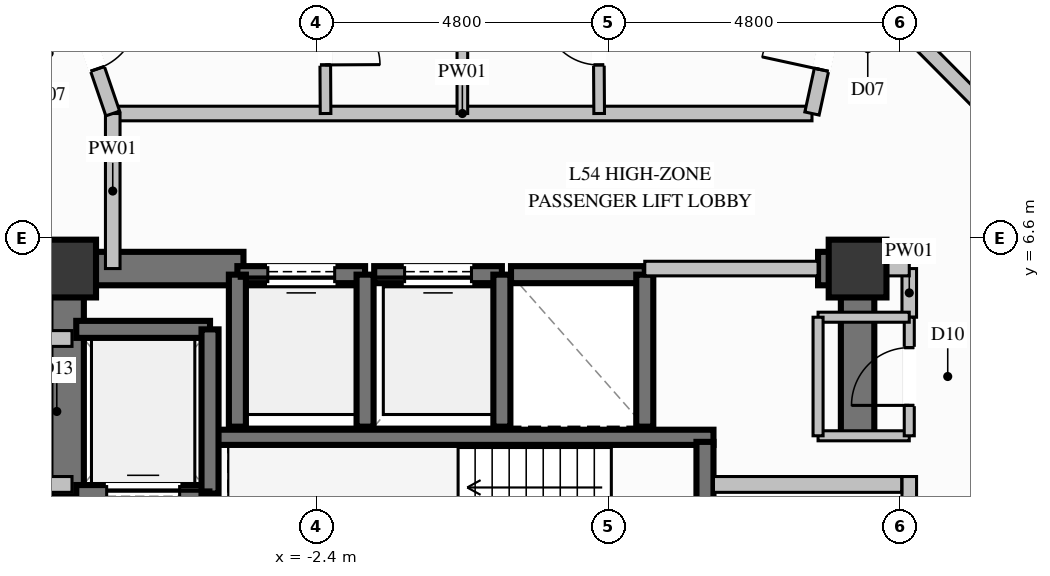
"""IFC4 building model, lengths in metres.
Left out: names, types, materials, properties, quantities, classifications, styles, units other than length and angle.
Written with IfcOpenShell. Run it as: python <this file> out.ifc"""

import sys

from ifc_helpers import new_model, si_unit, direction, frame, frame_2d, origin, origin_2d, place, context, subcontext, project, spatial, rectangle, extrude, element, fill, save


model = new_model("IFC4")
c1 = context("Model", 3, precision=1e-05, world=origin(), true_north=direction((0.0, 1.0)))
c2 = subcontext(c1, "Body", "Model", "MODEL_VIEW")
j1 = project(units=[si_unit("LENGTHUNIT", "METRE"), si_unit("PLANEANGLEUNIT", "RADIAN")], contexts=[c1])
p1 = place(None, origin())
s1 = spatial("IfcSite", under=j1, at=p1, CompositionType="ELEMENT")
p2 = place(p1, origin())
s2 = spatial("IfcBuilding", under=s1, at=p2, CompositionType="ELEMENT")
p3 = place(p2, frame((0.0, 0.0, 209.2)))
s3 = spatial("IfcBuildingStorey", under=s2, at=p3, CompositionType="ELEMENT", Elevation=209.2)
for number, where, z_axis, x_axis in (
    (1, (6.5, 6.1, 0.0), (0.0, 0.0, 1.0), (1.0, 0.0, 0.0)),
    (2, (-6.5, 6.1, 0.0), (0.0, 0.0, 1.0), (1.0, 0.0, 0.0)),
):
    element("IfcColumn", number, at=place(p3, frame(where, z_axis=z_axis, x_axis=x_axis)), inside=s3, PredefinedType="COLUMN", context=c2, shape_type="SweptSolid", body=[
        extrude(rectangle(XDim=0.95, YDim=0.95, at=origin_2d()), origin(), (0.0, 0.0, 1.0), 3.6),
    ])
p4 = place(p3, frame((-4.13, 3.325, 0.0), z_axis=(0.0, 0.0, 1.0), x_axis=(1.0, 0.0, 0.0)))
e3 = element("IfcWall", 3, at=p4, inside=s3, PredefinedType="SOLIDWALL", context=c2, shape_type="SweptSolid", body=[
    extrude(rectangle(XDim=8.26, YDim=0.25, at=frame_2d((4.13, 0.0))), origin(), (0.0, 0.0, 1.0), 3.6),
])
p5 = place(p3, frame((-6.225, 6.1, 0.0), z_axis=(0.0, 0.0, 1.0), x_axis=(1.0, 0.0, 0.0)))
e4 = element("IfcWall", 4, at=p5, inside=s3, PredefinedType="SHEAR", context=c2, shape_type="SweptSolid", body=[
    extrude(rectangle(XDim=2.625, YDim=0.55, at=frame_2d((1.312, 0.0))), origin(), (0.0, 0.0, 1.0), 3.6),
])
p6 = place(p3, frame((5.85, 6.1, 0.0), z_axis=(0.0, 0.0, 1.0), x_axis=(1.0, 0.0, 0.0)))
e5 = element("IfcWall", 5, at=p6, inside=s3, PredefinedType="SHEAR", context=c2, shape_type="SweptSolid", body=[
    extrude(rectangle(XDim=0.375, YDim=0.55, at=frame_2d((0.188, 0.0))), origin(), (0.0, 0.0, 1.0), 3.6),
])
p7 = place(p3, frame((-6.5, 2.35, 0.0), z_axis=(0.0, 0.0, 1.0), x_axis=(0.0, 1.0, 0.0)))
e6 = element("IfcWall", 6, at=p7, inside=s3, PredefinedType="SHEAR", context=c2, shape_type="SweptSolid", body=[
    extrude(rectangle(XDim=4.025, YDim=0.55, at=frame_2d((2.012, 0.0))), origin(), (0.0, 0.0, 1.0), 3.6),
])
p8 = place(p3, frame((6.5, 3.35, 0.0), z_axis=(0.0, 0.0, 1.0), x_axis=(0.0, 1.0, 0.0)))
e7 = element("IfcWall", 7, at=p8, inside=s3, PredefinedType="SHEAR", context=c2, shape_type="SweptSolid", body=[
    extrude(rectangle(XDim=3.025, YDim=0.55, at=frame_2d((1.512, 0.0))), origin(), (0.0, 0.0, 1.0), 3.6),
])
p9 = place(p3, frame((-1.6, 6.0, 0.0), z_axis=(0.0, 0.0, 1.0), x_axis=(-1.0, 0.0, 0.0)))
e8 = element("IfcWall", 8, at=p9, inside=s3, PredefinedType="SOLIDWALL", context=c2, shape_type="SweptSolid", body=[
    extrude(rectangle(XDim=2.1, YDim=0.28, at=frame_2d((1.05, 0.0))), origin(), (0.0, 0.0, 1.0), 3.36),
])
p10 = place(p9, frame((0.5, 0.0, 0.0)))
e9 = element("IfcOpeningElement", 9, at=p10, cuts=e8, PredefinedType="OPENING", context=c2, shape_type="SweptSolid", body=[
    extrude(rectangle(XDim=1.1, YDim=2.2, at=frame_2d((0.55, 1.1))), frame((0.0, 0.15, 0.0), z_axis=(0.0, -1.0, 0.0), x_axis=(1.0, 0.0, 0.0)), (0.0, 0.0, 1.0), 0.3),
])
for number, where, z_axis, x_axis in (
    (10, (-3.7, 6.0, 0.0), (0.0, 0.0, 1.0), (0.0, -1.0, 0.0)),
    (11, (-1.6, 3.5, 0.0), (0.0, 0.0, 1.0), (0.0, 1.0, 0.0)),
):
    element("IfcWall", number, at=place(p3, frame(where, z_axis=z_axis, x_axis=x_axis)), inside=s3, PredefinedType="SOLIDWALL", context=c2, shape_type="SweptSolid", body=[
        extrude(rectangle(XDim=2.5, YDim=0.28, at=frame_2d((1.25, 0.0))), origin(), (0.0, 0.0, 1.0), 3.36),
    ])
p11 = place(p3, frame((0.65, 6.0, 0.0), z_axis=(0.0, 0.0, 1.0), x_axis=(-1.0, 0.0, 0.0)))
e12 = element("IfcWall", 12, at=p11, inside=s3, PredefinedType="SOLIDWALL", context=c2, shape_type="SweptSolid", body=[
    extrude(rectangle(XDim=2.1, YDim=0.28, at=frame_2d((1.05, 0.0))), origin(), (0.0, 0.0, 1.0), 3.36),
])
p12 = place(p11, frame((0.5, 0.0, 0.0)))
e13 = element("IfcOpeningElement", 13, at=p12, cuts=e12, PredefinedType="OPENING", context=c2, shape_type="SweptSolid", body=[
    extrude(rectangle(XDim=1.1, YDim=2.2, at=frame_2d((0.55, 1.1))), frame((0.0, 0.15, 0.0), z_axis=(0.0, -1.0, 0.0), x_axis=(1.0, 0.0, 0.0)), (0.0, 0.0, 1.0), 0.3),
])
p13 = place(p3, frame((0.65, 3.5, 0.0), z_axis=(0.0, 0.0, 1.0), x_axis=(0.0, 1.0, 0.0)))
e14 = element("IfcWall", 14, at=p13, inside=s3, PredefinedType="SOLIDWALL", context=c2, shape_type="SweptSolid", body=[
    extrude(rectangle(XDim=2.5, YDim=0.28, at=frame_2d((1.25, 0.0))), origin(), (0.0, 0.0, 1.0), 3.36),
])
p14 = place(p3, frame((3.0, 6.0, 0.0), z_axis=(0.0, 0.0, 1.0), x_axis=(-1.0, 0.0, 0.0)))
e15 = element("IfcWall", 15, at=p14, inside=s3, PredefinedType="SOLIDWALL", context=c2, shape_type="SweptSolid", body=[
    extrude(rectangle(XDim=2.2, YDim=0.28, at=frame_2d((1.1, 0.0))), origin(), (0.0, 0.0, 1.0), 3.36),
])
p15 = place(p3, frame((3.0, 3.5, 0.0), z_axis=(0.0, 0.0, 1.0), x_axis=(0.0, 1.0, 0.0)))
e16 = element("IfcWall", 16, at=p15, inside=s3, PredefinedType="SOLIDWALL", context=c2, shape_type="SweptSolid", body=[
    extrude(rectangle(XDim=2.5, YDim=0.28, at=frame_2d((1.25, 0.0))), origin(), (0.0, 0.0, 1.0), 3.36),
])
p16 = place(p3, frame((-6.35, 2.4, 0.0), z_axis=(0.0, 0.0, 1.0), x_axis=(1.0, 0.0, 0.0)))
e17 = element("IfcWall", 17, at=p16, inside=s3, PredefinedType="SOLIDWALL", context=c2, shape_type="SweptSolid", body=[
    extrude(rectangle(XDim=2.2, YDim=0.28, at=frame_2d((1.1, 0.0))), origin(), (0.0, 0.0, 1.0), 3.36),
])
p17 = place(p16, frame((0.5, 0.0, 0.0)))
e18 = element("IfcOpeningElement", 18, at=p17, cuts=e17, PredefinedType="OPENING", context=c2, shape_type="SweptSolid", body=[
    extrude(rectangle(XDim=1.2, YDim=2.2, at=frame_2d((0.6, 1.1))), frame((0.0, 0.15, 0.0), z_axis=(0.0, -1.0, 0.0), x_axis=(1.0, 0.0, 0.0)), (0.0, 0.0, 1.0), 0.3),
])
p18 = place(p3, frame((-4.15, 5.1, 0.0), z_axis=(0.0, 0.0, 1.0), x_axis=(-1.0, 0.0, 0.0)))
e19 = element("IfcWall", 19, at=p18, inside=s3, PredefinedType="SOLIDWALL", context=c2, shape_type="SweptSolid", body=[
    extrude(rectangle(XDim=2.2, YDim=0.28, at=frame_2d((1.1, 0.0))), origin(), (0.0, 0.0, 1.0), 3.36),
])
p19 = place(p3, frame((-4.15, 2.4, 0.0), z_axis=(0.0, 0.0, 1.0), x_axis=(0.0, 1.0, 0.0)))
e20 = element("IfcWall", 20, at=p19, inside=s3, PredefinedType="SOLIDWALL", context=c2, shape_type="SweptSolid", body=[
    extrude(rectangle(XDim=2.7, YDim=0.28, at=frame_2d((1.35, 0.0))), origin(), (0.0, 0.0, 1.0), 3.36),
])
p20 = place(p3, frame((3.99, -2.21, 0.0), z_axis=(0.0, 0.0, 1.0), x_axis=(0.0, 1.0, 0.0)))
e21 = element("IfcWall", 21, at=p20, inside=s3, PredefinedType="SOLIDWALL", context=c2, shape_type="SweptSolid", body=[
    extrude(rectangle(XDim=5.46, YDim=0.28, at=frame_2d((2.73, 0.0))), origin(), (0.0, 0.0, 1.0), 3.36),
])
p21 = place(p20, frame((3.323, 0.0, 0.0)))
e22 = element("IfcOpeningElement", 22, at=p21, cuts=e21, PredefinedType="OPENING", context=c2, shape_type="SweptSolid", body=[
    extrude(rectangle(XDim=1.2, YDim=2.2, at=frame_2d((0.6, 1.1))), frame((0.0, 0.15, 0.0), z_axis=(0.0, -1.0, 0.0), x_axis=(1.0, 0.0, 0.0)), (0.0, 0.0, 1.0), 0.3),
])
p22 = place(p3, frame((7.35, -2.34, 0.0), z_axis=(0.0, 0.0, 1.0), x_axis=(0.0, 1.0, 0.0)))
e23 = element("IfcWall", 23, at=p22, inside=s3, PredefinedType="PARTITIONING", context=c2, shape_type="SweptSolid", body=[
    extrude(rectangle(XDim=5.02, YDim=0.24, at=frame_2d((2.51, 0.0))), origin(), (0.0, 0.0, 1.0), 2.445),
])
p23 = place(p22, frame((2.515, 0.0, 0.0)))
e24 = element("IfcOpeningElement", 24, at=p23, cuts=e23, PredefinedType="OPENING", context=c2, shape_type="SweptSolid", body=[
    extrude(rectangle(XDim=1.15, YDim=2.2, at=frame_2d((0.575, 1.1))), frame((0.0, 0.13, 0.0), z_axis=(0.0, -1.0, 0.0), x_axis=(1.0, 0.0, 0.0)), (0.0, 0.0, 1.0), 0.26),
])
p24 = place(p3, frame((4.13, 2.55, 0.0), z_axis=(0.0, 0.0, 1.0), x_axis=(1.0, 0.0, 0.0)))
e25 = element("IfcWall", 25, at=p24, inside=s3, PredefinedType="PARTITIONING", context=c2, shape_type="SweptSolid", body=[
    extrude(rectangle(XDim=3.095, YDim=0.26, at=frame_2d((1.548, 0.0))), origin(), (0.0, 0.0, 1.0), 3.36),
])
for number, where, z_axis, x_axis in (
    (26, (-7.35, 4.95, 0.0), (0.0, 0.0, 1.0), (1.0, 0.0, 0.0)),
    (27, (-7.35, 2.55, 0.0), (0.0, 0.0, 1.0), (1.0, 0.0, 0.0)),
):
    element("IfcWall", number, at=place(p3, frame(where, z_axis=z_axis, x_axis=x_axis)), inside=s3, PredefinedType="PARTITIONING", context=c2, shape_type="SweptSolid", body=[
        extrude(rectangle(XDim=0.93, YDim=0.26, at=frame_2d((0.465, 0.0))), origin(), (0.0, 0.0, 1.0), 3.36),
    ])
p25 = place(p3, frame((-5.75, 8.65, 0.0), z_axis=(0.0, 0.0, 1.0), x_axis=(1.0, 0.0, 0.0)))
e28 = element("IfcWall", 28, at=p25, inside=s3, PredefinedType="PARTITIONING", context=c2, shape_type="SweptSolid", body=[
    extrude(rectangle(XDim=11.5, YDim=0.24, at=frame_2d((5.75, 0.0))), origin(), (0.0, 0.0, 1.0), 3.36),
])
p26 = place(p3, frame((3.0, 6.1, 0.0), z_axis=(0.0, 0.0, 1.0), x_axis=(1.0, 0.0, 0.0)))
e29 = element("IfcWall", 29, at=p26, inside=s3, PredefinedType="PARTITIONING", context=c2, shape_type="SweptSolid", body=[
    extrude(rectangle(XDim=2.85, YDim=0.24, at=frame_2d((1.425, 0.0))), origin(), (0.0, 0.0, 1.0), 2.445),
])
p27 = place(p3, frame((7.35, 5.3, 0.0), z_axis=(0.0, 0.0, 1.0), x_axis=(0.0, 1.0, 0.0)))
e30 = element("IfcWall", 30, at=p27, inside=s3, PredefinedType="PARTITIONING", context=c2, shape_type="SweptSolid", body=[
    extrude(rectangle(XDim=0.8, YDim=0.24, at=frame_2d((0.4, 0.0))), origin(), (0.0, 0.0, 1.0), 2.445),
])
p28 = place(p3, frame((6.5, 6.1, 0.0), z_axis=(0.0, 0.0, 1.0), x_axis=(1.0, 0.0, 0.0)))
e31 = element("IfcWall", 31, at=p28, inside=s3, PredefinedType="PARTITIONING", context=c2, shape_type="SweptSolid", body=[
    extrude(rectangle(XDim=0.85, YDim=0.24, at=frame_2d((0.425, 0.0))), origin(), (0.0, 0.0, 1.0), 2.801),
])
p29 = place(p3, frame((-5.75, 6.1, 0.0), z_axis=(0.0, 0.0, 1.0), x_axis=(0.0, 1.0, 0.0)))
e32 = element("IfcWall", 32, at=p29, inside=s3, PredefinedType="PARTITIONING", context=c2, shape_type="SweptSolid", body=[
    extrude(rectangle(XDim=2.55, YDim=0.24, at=frame_2d((1.275, 0.0))), origin(), (0.0, 0.0, 1.0), 3.36),
])
p30 = place(p3, frame((-7.35, 6.1, 0.0), z_axis=(0.0, 0.0, 1.0), x_axis=(1.0, 0.0, 0.0)))
e33 = element("IfcWall", 33, at=p30, inside=s3, PredefinedType="PARTITIONING", context=c2, shape_type="SweptSolid", body=[
    extrude(rectangle(XDim=0.85, YDim=0.24, at=frame_2d((0.425, 0.0))), origin(), (0.0, 0.0, 1.0), 2.801),
])
p31 = place(p3, frame((5.85, 3.35, 0.0), z_axis=(0.0, 0.0, 1.0), x_axis=(1.0, 0.0, 0.0)))
e34 = element("IfcWall", 34, at=p31, inside=s3, PredefinedType="PARTITIONING", context=c2, shape_type="SweptSolid", body=[
    extrude(rectangle(XDim=1.5, YDim=0.165, at=frame_2d((0.75, 0.0))), origin(), (0.0, 0.0, 1.0), 3.36),
])
p32 = place(p3, frame((7.35, 3.35, 0.0), z_axis=(0.0, 0.0, 1.0), x_axis=(0.0, 1.0, 0.0)))
e35 = element("IfcWall", 35, at=p32, inside=s3, PredefinedType="PARTITIONING", context=c2, shape_type="SweptSolid", body=[
    extrude(rectangle(XDim=1.95, YDim=0.165, at=frame_2d((0.975, 0.0))), origin(), (0.0, 0.0, 1.0), 3.36),
])
p33 = place(p32, frame((0.5, 0.0, 0.0)))
e36 = element("IfcOpeningElement", 36, at=p33, cuts=e35, PredefinedType="OPENING", context=c2, shape_type="SweptSolid", body=[
    extrude(rectangle(XDim=0.95, YDim=2.1, at=frame_2d((0.475, 1.05))), frame((0.0, 0.093, 0.0), z_axis=(0.0, -1.0, 0.0), x_axis=(1.0, 0.0, 0.0)), (0.0, 0.0, 1.0), 0.185),
])
p34 = place(p3, frame((7.35, 5.3, 0.0), z_axis=(0.0, 0.0, 1.0), x_axis=(-1.0, 0.0, 0.0)))
e37 = element("IfcWall", 37, at=p34, inside=s3, PredefinedType="PARTITIONING", context=c2, shape_type="SweptSolid", body=[
    extrude(rectangle(XDim=1.5, YDim=0.165, at=frame_2d((0.75, 0.0))), origin(), (0.0, 0.0, 1.0), 2.445),
])
p35 = place(p3, frame((5.85, 5.3, 0.0), z_axis=(0.0, 0.0, 1.0), x_axis=(0.0, -1.0, 0.0)))
e38 = element("IfcWall", 38, at=p35, inside=s3, PredefinedType="PARTITIONING", context=c2, shape_type="SweptSolid", body=[
    extrude(rectangle(XDim=1.95, YDim=0.165, at=frame_2d((0.975, 0.0))), origin(), (0.0, 0.0, 1.0), 2.445),
])
p36 = place(p3, frame((0.0, 12.128, 0.0), z_axis=(0.0, 0.0, 1.0), x_axis=(0.0, -1.0, 0.0)))
e39 = element("IfcWall", 39, at=p36, inside=s3, PredefinedType="PLUMBINGWALL", context=c2, shape_type="SweptSolid", body=[
    extrude(rectangle(XDim=3.478, YDim=0.175, at=frame_2d((1.739, 0.0))), origin(), (0.0, 0.0, 1.0), 3.36),
])
p37 = place(p3, frame((2.25, 8.65, 0.0), z_axis=(0.0, 0.0, 1.0), x_axis=(-0.005961582878, 0.999982229607, 0.0)))
e40 = element("IfcWall", 40, at=p37, inside=s3, PredefinedType="PLUMBINGWALL", context=c2, shape_type="SweptSolid", body=[
    extrude(rectangle(XDim=2.498, YDim=0.175, at=frame_2d((1.249, 0.0))), origin(), (0.0, 0.0, 1.0), 3.36),
])
p38 = place(p37, frame((0.799, 0.0, 0.0)))
e41 = element("IfcOpeningElement", 41, at=p38, cuts=e40, PredefinedType="OPENING", context=c2, shape_type="SweptSolid", body=[
    extrude(rectangle(XDim=0.9, YDim=2.1, at=frame_2d((0.45, 1.05))), frame((0.0, 0.098, 0.0), z_axis=(0.0, -1.0, 0.0), x_axis=(1.0, 0.0, 0.0)), (0.0, 0.0, 1.0), 0.195),
])
p39 = place(p3, frame((5.75, 8.65, 0.0), z_axis=(0.0, 0.0, 1.0), x_axis=(0.212388632151, 0.977185278713, 0.0)))
e42 = element("IfcWall", 42, at=p39, inside=s3, PredefinedType="PARTITIONING", context=c2, shape_type="SweptSolid", body=[
    extrude(rectangle(XDim=2.471, YDim=0.24, at=frame_2d((1.236, 0.0))), origin(), (0.0, 0.0, 1.0), 3.36),
])
p40 = place(p39, frame((0.736, 0.0, 0.0)))
e43 = element("IfcOpeningElement", 43, at=p40, cuts=e42, PredefinedType="OPENING", context=c2, shape_type="SweptSolid", body=[
    extrude(rectangle(XDim=1.0, YDim=2.2, at=frame_2d((0.5, 1.1))), frame((0.0, 0.13, 0.0), z_axis=(0.0, -1.0, 0.0), x_axis=(1.0, 0.0, 0.0)), (0.0, 0.0, 1.0), 0.26),
])
p41 = place(p3, frame((-2.264, 11.148, 0.0), z_axis=(0.0, 0.0, 1.0), x_axis=(0.005570671967, -0.999984483687, 0.0)))
e44 = element("IfcWall", 44, at=p41, inside=s3, PredefinedType="PLUMBINGWALL", context=c2, shape_type="SweptSolid", body=[
    extrude(rectangle(XDim=2.498, YDim=0.175, at=frame_2d((1.249, 0.0))), origin(), (0.0, 0.0, 1.0), 3.36),
])
p42 = place(p41, frame((0.799, 0.0, 0.0)))
e45 = element("IfcOpeningElement", 45, at=p42, cuts=e44, PredefinedType="OPENING", context=c2, shape_type="SweptSolid", body=[
    extrude(rectangle(XDim=0.9, YDim=2.1, at=frame_2d((0.45, 1.05))), frame((0.0, 0.098, 0.0), z_axis=(0.0, -1.0, 0.0), x_axis=(1.0, 0.0, 0.0)), (0.0, 0.0, 1.0), 0.195),
])
p43 = place(p3, frame((-6.575, 11.065, 0.0), z_axis=(0.0, 0.0, 1.0), x_axis=(0.323250422642, -0.946313459833, 0.0)))
e46 = element("IfcWall", 46, at=p43, inside=s3, PredefinedType="PARTITIONING", context=c2, shape_type="SweptSolid", body=[
    extrude(rectangle(XDim=2.552, YDim=0.24, at=frame_2d((1.276, 0.0))), origin(), (0.0, 0.0, 1.0), 3.36),
])
p44 = place(p43, frame((0.776, 0.0, 0.0)))
e47 = element("IfcOpeningElement", 47, at=p44, cuts=e46, PredefinedType="OPENING", context=c2, shape_type="SweptSolid", body=[
    extrude(rectangle(XDim=1.0, YDim=2.2, at=frame_2d((0.5, 1.1))), frame((0.0, 0.13, 0.0), z_axis=(0.0, -1.0, 0.0), x_axis=(1.0, 0.0, 0.0)), (0.0, 0.0, 1.0), 0.26),
])
p45 = place(p3, frame((-6.575, 11.065, 0.0), z_axis=(0.0, 0.0, 1.0), x_axis=(-0.704271845888, -0.709930395947, 0.0)))
e48 = element("IfcWall", 48, at=p45, inside=s3, PredefinedType="PARTITIONING", context=c2, shape_type="SweptSolid", body=[
    extrude(rectangle(XDim=2.804, YDim=0.24, at=frame_2d((1.402, 0.0))), origin(), (0.0, 0.0, 1.0), 3.36),
])
p46 = place(p3, frame((10.978, 6.325, 0.0), z_axis=(0.0, 0.0, 1.0), x_axis=(-0.704340920508, 0.709861865223, 0.0)))
e49 = element("IfcWall", 49, at=p46, inside=s3, PredefinedType="PARTITIONING", context=c2, shape_type="SweptSolid", body=[
    extrude(rectangle(XDim=6.677, YDim=0.24, at=frame_2d((3.339, 0.0))), origin(), (0.0, 0.0, 1.0), 3.36),
])
p47 = place(p10, origin())
e50 = element("IfcDoor", 50, at=p47, inside=s3, OperationType="SLIDING_TO_LEFT", PredefinedType="DOOR", context=c2, shape_type="SweptSolid", body=[
    extrude(rectangle(XDim=1.1, YDim=2.2, at=frame_2d((0.55, 1.1))), frame((0.0, 0.025, 0.0), z_axis=(0.0, -1.0, 0.0), x_axis=(1.0, 0.0, 0.0)), (0.0, 0.0, 1.0), 0.05),
])
fill(e9, e50)
p48 = place(p12, origin())
e51 = element("IfcDoor", 51, at=p48, inside=s3, OperationType="SLIDING_TO_LEFT", PredefinedType="DOOR", context=c2, shape_type="SweptSolid", body=[
    extrude(rectangle(XDim=1.1, YDim=2.2, at=frame_2d((0.55, 1.1))), frame((0.0, 0.025, 0.0), z_axis=(0.0, -1.0, 0.0), x_axis=(1.0, 0.0, 0.0)), (0.0, 0.0, 1.0), 0.05),
])
fill(e13, e51)
p49 = place(p17, origin())
e52 = element("IfcDoor", 52, at=p49, inside=s3, OperationType="SLIDING_TO_LEFT", PredefinedType="DOOR", context=c2, shape_type="SweptSolid", body=[
    extrude(rectangle(XDim=1.2, YDim=2.2, at=frame_2d((0.6, 1.1))), frame((0.0, 0.025, 0.0), z_axis=(0.0, -1.0, 0.0), x_axis=(1.0, 0.0, 0.0)), (0.0, 0.0, 1.0), 0.05),
])
fill(e18, e52)
p50 = place(p33, origin())
e53 = element("IfcDoor", 53, at=p50, inside=s3, OperationType="SINGLE_SWING_LEFT", PredefinedType="DOOR", context=c2, shape_type="SweptSolid", body=[
    extrude(rectangle(XDim=0.95, YDim=2.1, at=frame_2d((0.475, 1.05))), frame((0.0, 0.025, 0.0), z_axis=(0.0, -1.0, 0.0), x_axis=(1.0, 0.0, 0.0)), (0.0, 0.0, 1.0), 0.05),
])
fill(e36, e53)
p51 = place(p38, origin())
e54 = element("IfcDoor", 54, at=p51, inside=s3, OperationType="SINGLE_SWING_RIGHT", PredefinedType="DOOR", context=c2, shape_type="SweptSolid", body=[
    extrude(rectangle(XDim=0.9, YDim=2.1, at=frame_2d((0.45, 1.05))), frame((0.0, 0.025, 0.0), z_axis=(0.0, -1.0, 0.0), x_axis=(1.0, 0.0, 0.0)), (0.0, 0.0, 1.0), 0.05),
])
fill(e41, e54)
p52 = place(p40, origin())
e55 = element("IfcDoor", 55, at=p52, inside=s3, OperationType="SINGLE_SWING_LEFT", PredefinedType="DOOR", context=c2, shape_type="SweptSolid", body=[
    extrude(rectangle(XDim=1.0, YDim=2.2, at=frame_2d((0.5, 1.1))), frame((0.0, 0.025, 0.0), z_axis=(0.0, -1.0, 0.0), x_axis=(1.0, 0.0, 0.0)), (0.0, 0.0, 1.0), 0.05),
])
fill(e43, e55)
p53 = place(p42, origin())
e56 = element("IfcDoor", 56, at=p53, inside=s3, OperationType="SINGLE_SWING_RIGHT", PredefinedType="DOOR", context=c2, shape_type="SweptSolid", body=[
    extrude(rectangle(XDim=0.9, YDim=2.1, at=frame_2d((0.45, 1.05))), frame((0.0, 0.025, 0.0), z_axis=(0.0, -1.0, 0.0), x_axis=(1.0, 0.0, 0.0)), (0.0, 0.0, 1.0), 0.05),
])
fill(e45, e56)
p54 = place(p44, origin())
e57 = element("IfcDoor", 57, at=p54, inside=s3, OperationType="SINGLE_SWING_LEFT", PredefinedType="DOOR", context=c2, shape_type="SweptSolid", body=[
    extrude(rectangle(XDim=1.0, YDim=2.2, at=frame_2d((0.5, 1.1))), frame((0.0, 0.025, 0.0), z_axis=(0.0, -1.0, 0.0), x_axis=(1.0, 0.0, 0.0)), (0.0, 0.0, 1.0), 0.05),
])
fill(e47, e57)
save(model, sys.argv[1])
